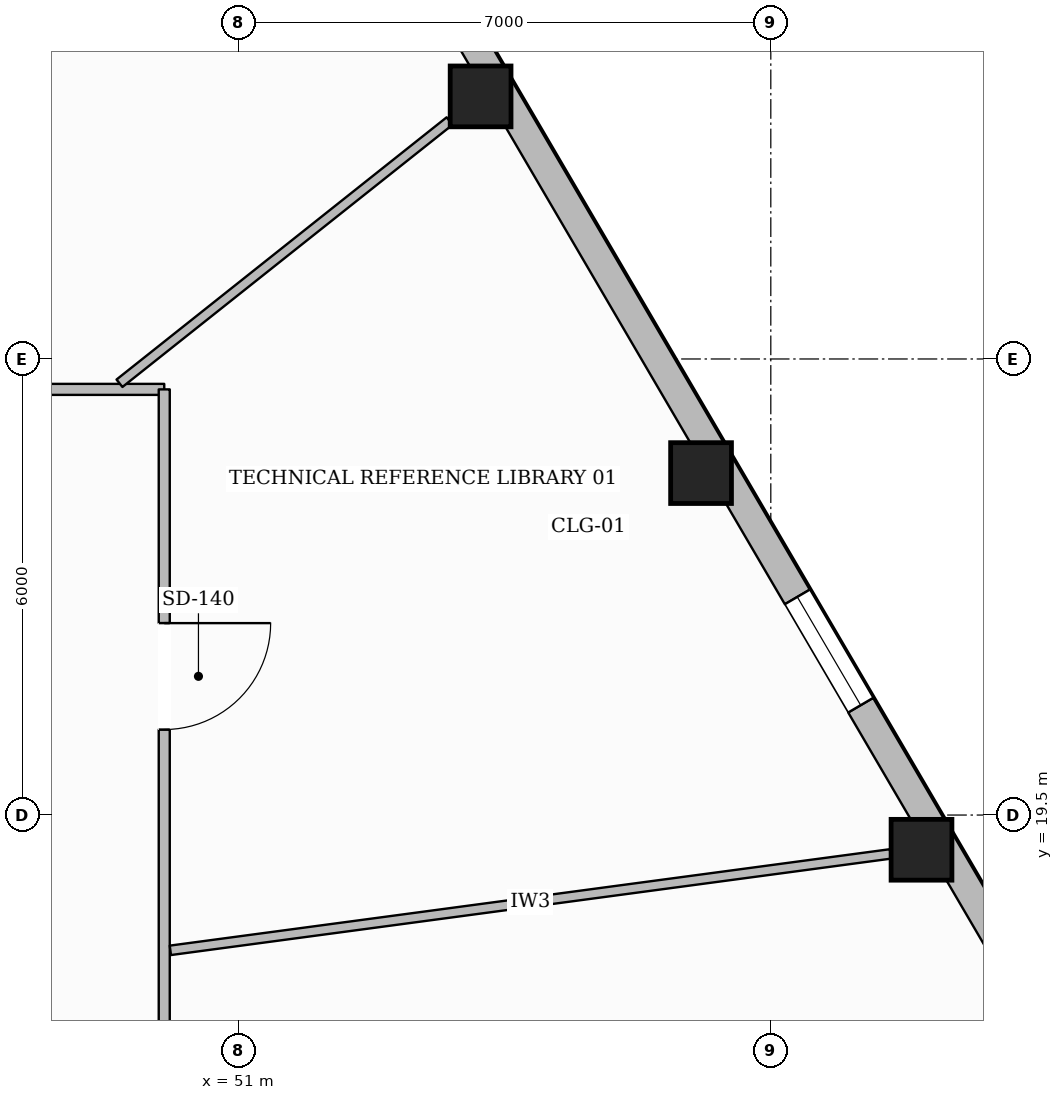
"""IFC4 building model, lengths in metres.
Left out: names, types, materials, properties, quantities, classifications, styles, units other than length and angle.
Written with IfcOpenShell. Run it as: python <this file> out.ifc"""

import sys

from ifc_helpers import new_model, si_unit, direction, frame, frame_2d, origin, origin_2d, place, context, subcontext, project, spatial, rectangle, hollow_rectangle, extrude, element, fill, save


model = new_model("IFC4")
c1 = context("Model", 3, precision=1e-05, world=origin(), true_north=direction((0.0, 1.0)))
c2 = subcontext(c1, "Body", "Model", "MODEL_VIEW")
j1 = project(units=[si_unit("LENGTHUNIT", "METRE"), si_unit("PLANEANGLEUNIT", "RADIAN")], contexts=[c1])
p1 = place(None, origin())
s1 = spatial("IfcSite", under=j1, at=p1, CompositionType="ELEMENT")
p2 = place(p1, origin())
s2 = spatial("IfcBuilding", under=s1, at=p2, CompositionType="ELEMENT")
p3 = place(p2, frame((0.0, 0.0, 52.2)))
s3 = spatial("IfcBuildingStorey", under=s2, at=p3, CompositionType="ELEMENT", Elevation=52.2)
for number, where, z_axis, x_axis in (
    (1, (59.983, 19.043, 0.0), (0.0, 0.0, 1.0), (1.0, 0.0, 0.0)),
    (2, (57.082, 23.999, 0.0), (0.0, 0.0, 1.0), (1.0, 0.0, 0.0)),
    (3, (54.182, 28.955, 0.0), (0.0, 0.0, 1.0), (1.0, 0.0, 0.0)),
):
    element("IfcColumn", number, at=place(p3, frame(where, z_axis=z_axis, x_axis=x_axis)), inside=s3, PredefinedType="COLUMN", context=c2, shape_type="SweptSolid", body=[
        extrude(hollow_rectangle(XDim=0.8, YDim=0.8, WallThickness=0.036, at=origin_2d()), origin(), (0.0, 0.0, 1.0), 3.59),
    ])
p4 = place(p3, frame((45.475, 44.367, 0.0), z_axis=(0.0, 0.0, 1.0), x_axis=(0.505110430219, -0.863054722068, 0.0)))
e4 = element("IfcWall", 4, at=p4, inside=s3, PredefinedType="STANDARD", context=c2, shape_type="SweptSolid", body=[
    extrude(rectangle(XDim=35.405, YDim=0.38, at=frame_2d((17.703, 0.0))), origin(), (0.0, 0.0, 1.0), 2.97),
])
p5 = place(p4, frame((31.23, 0.0, 0.65)))
e5 = element("IfcOpeningElement", 5, at=p5, cuts=e4, PredefinedType="OPENING", context=c2, shape_type="SweptSolid", body=[
    extrude(rectangle(XDim=1.65, YDim=1.75, at=frame_2d((0.825, 0.875))), frame((0.0, 0.2, 0.0), z_axis=(0.0, -1.0, 0.0), x_axis=(1.0, 0.0, 0.0)), (0.0, 0.0, 1.0), 0.4),
])
p6 = place(p4, frame((25.488, 0.0, 0.65)))
e6 = element("IfcOpeningElement", 6, at=p6, cuts=e4, PredefinedType="OPENING", context=c2, shape_type="SweptSolid", body=[
    extrude(rectangle(XDim=1.65, YDim=1.75, at=frame_2d((0.825, 0.875))), frame((0.0, 0.2, 0.0), z_axis=(0.0, -1.0, 0.0), x_axis=(1.0, 0.0, 0.0)), (0.0, 0.0, 1.0), 0.4),
])
p7 = place(p4, frame((14.004, 0.0, 0.65)))
e7 = element("IfcOpeningElement", 7, at=p7, cuts=e4, PredefinedType="OPENING", context=c2, shape_type="SweptSolid", body=[
    extrude(rectangle(XDim=1.65, YDim=1.75, at=frame_2d((0.825, 0.875))), frame((0.0, 0.2, 0.0), z_axis=(0.0, -1.0, 0.0), x_axis=(1.0, 0.0, 0.0)), (0.0, 0.0, 1.0), 0.4),
])
p8 = place(p4, frame((8.262, 0.0, 0.65)))
e8 = element("IfcOpeningElement", 8, at=p8, cuts=e4, PredefinedType="OPENING", context=c2, shape_type="SweptSolid", body=[
    extrude(rectangle(XDim=1.65, YDim=1.75, at=frame_2d((0.825, 0.875))), frame((0.0, 0.2, 0.0), z_axis=(0.0, -1.0, 0.0), x_axis=(1.0, 0.0, 0.0)), (0.0, 0.0, 1.0), 0.4),
])
p9 = place(p4, frame((2.52, 0.0, 0.65)))
e9 = element("IfcOpeningElement", 9, at=p9, cuts=e4, PredefinedType="OPENING", context=c2, shape_type="SweptSolid", body=[
    extrude(rectangle(XDim=1.65, YDim=1.75, at=frame_2d((0.825, 0.875))), frame((0.0, 0.2, 0.0), z_axis=(0.0, -1.0, 0.0), x_axis=(1.0, 0.0, 0.0)), (0.0, 0.0, 1.0), 0.4),
])
p10 = place(p3, frame((39.0, 25.1, 0.0), z_axis=(0.0, 0.0, 1.0), x_axis=(1.0, 0.0, 0.0)))
e10 = element("IfcWall", 10, at=p10, inside=s3, PredefinedType="PARTITIONING", context=c2, shape_type="SweptSolid", body=[
    extrude(rectangle(XDim=11.02, YDim=0.145, at=frame_2d((5.51, 0.0))), origin(), (0.0, 0.0, 1.0), 3.59),
])
p11 = place(p10, frame((5.189, 0.0, 0.0)))
e11 = element("IfcOpeningElement", 11, at=p11, cuts=e10, PredefinedType="OPENING", context=c2, shape_type="SweptSolid", body=[
    extrude(rectangle(XDim=1.4, YDim=2.2, at=frame_2d((0.7, 1.1))), frame((0.0, 0.083, 0.0), z_axis=(0.0, -1.0, 0.0), x_axis=(1.0, 0.0, 0.0)), (0.0, 0.0, 1.0), 0.165),
])
p12 = place(p3, frame((50.02, 25.1, 0.0), z_axis=(0.0, 0.0, 1.0), x_axis=(0.0, -1.0, 0.0)))
e12 = element("IfcWall", 12, at=p12, inside=s3, PredefinedType="PARTITIONING", context=c2, shape_type="SweptSolid", body=[
    extrude(rectangle(XDim=16.0, YDim=0.145, at=frame_2d((8.0, 0.0))), origin(), (0.0, 0.0, 1.0), 3.278),
])
p13 = place(p12, frame((3.075, 0.0, 0.0)))
e13 = element("IfcOpeningElement", 13, at=p13, cuts=e12, PredefinedType="OPENING", context=c2, shape_type="SweptSolid", body=[
    extrude(rectangle(XDim=1.4, YDim=2.2, at=frame_2d((0.7, 1.1))), frame((0.0, 0.083, 0.0), z_axis=(0.0, -1.0, 0.0), x_axis=(1.0, 0.0, 0.0)), (0.0, 0.0, 1.0), 0.165),
])
p14 = place(p12, frame((9.224, 0.0, 0.0)))
e14 = element("IfcOpeningElement", 14, at=p14, cuts=e12, PredefinedType="OPENING", context=c2, shape_type="SweptSolid", body=[
    extrude(rectangle(XDim=1.4, YDim=2.2, at=frame_2d((0.7, 1.1))), frame((0.0, 0.083, 0.0), z_axis=(0.0, -1.0, 0.0), x_axis=(1.0, 0.0, 0.0)), (0.0, 0.0, 1.0), 0.165),
])
p15 = place(p3, frame((50.101, 17.72, 0.0), z_axis=(0.0, 0.0, 1.0), x_axis=(0.991157941882, 0.132687355256, 0.0)))
e15 = element("IfcWall", 15, at=p15, inside=s3, PredefinedType="PARTITIONING", context=c2, shape_type="SweptSolid", body=[
    extrude(rectangle(XDim=9.559, YDim=0.125, at=frame_2d((4.779, 0.0))), origin(), (0.0, 0.0, 1.0), 3.057),
])
p16 = place(p3, frame((49.431, 25.18, 0.0), z_axis=(0.0, 0.0, 1.0), x_axis=(0.783015635843, 0.622002020917, 0.0)))
e16 = element("IfcWall", 16, at=p16, inside=s3, PredefinedType="PARTITIONING", context=c2, shape_type="SweptSolid", body=[
    extrude(rectangle(XDim=5.547, YDim=0.125, at=frame_2d((2.773, 0.0))), origin(), (0.0, 0.0, 1.0), 3.057),
])
p17 = place(p6, origin())
e17 = element("IfcWindow", 17, at=p17, inside=s3, PartitioningType="SINGLE_PANEL", PredefinedType="WINDOW", context=c2, shape_type="SweptSolid", body=[
    extrude(rectangle(XDim=1.65, YDim=1.75, at=frame_2d((0.825, 0.875))), frame((0.0, 0.03, 0.0), z_axis=(0.0, -1.0, 0.0), x_axis=(1.0, 0.0, 0.0)), (0.0, 0.0, 1.0), 0.06),
])
fill(e6, e17)
p18 = place(p13, origin())
e18 = element("IfcDoor", 18, at=p18, inside=s3, OperationType="SINGLE_SWING_LEFT", PredefinedType="DOOR", context=c2, shape_type="SweptSolid", body=[
    extrude(rectangle(XDim=1.4, YDim=2.2, at=frame_2d((0.7, 1.1))), frame((0.0, 0.025, 0.0), z_axis=(0.0, -1.0, 0.0), x_axis=(1.0, 0.0, 0.0)), (0.0, 0.0, 1.0), 0.05),
])
fill(e13, e18)
save(model, sys.argv[1])
